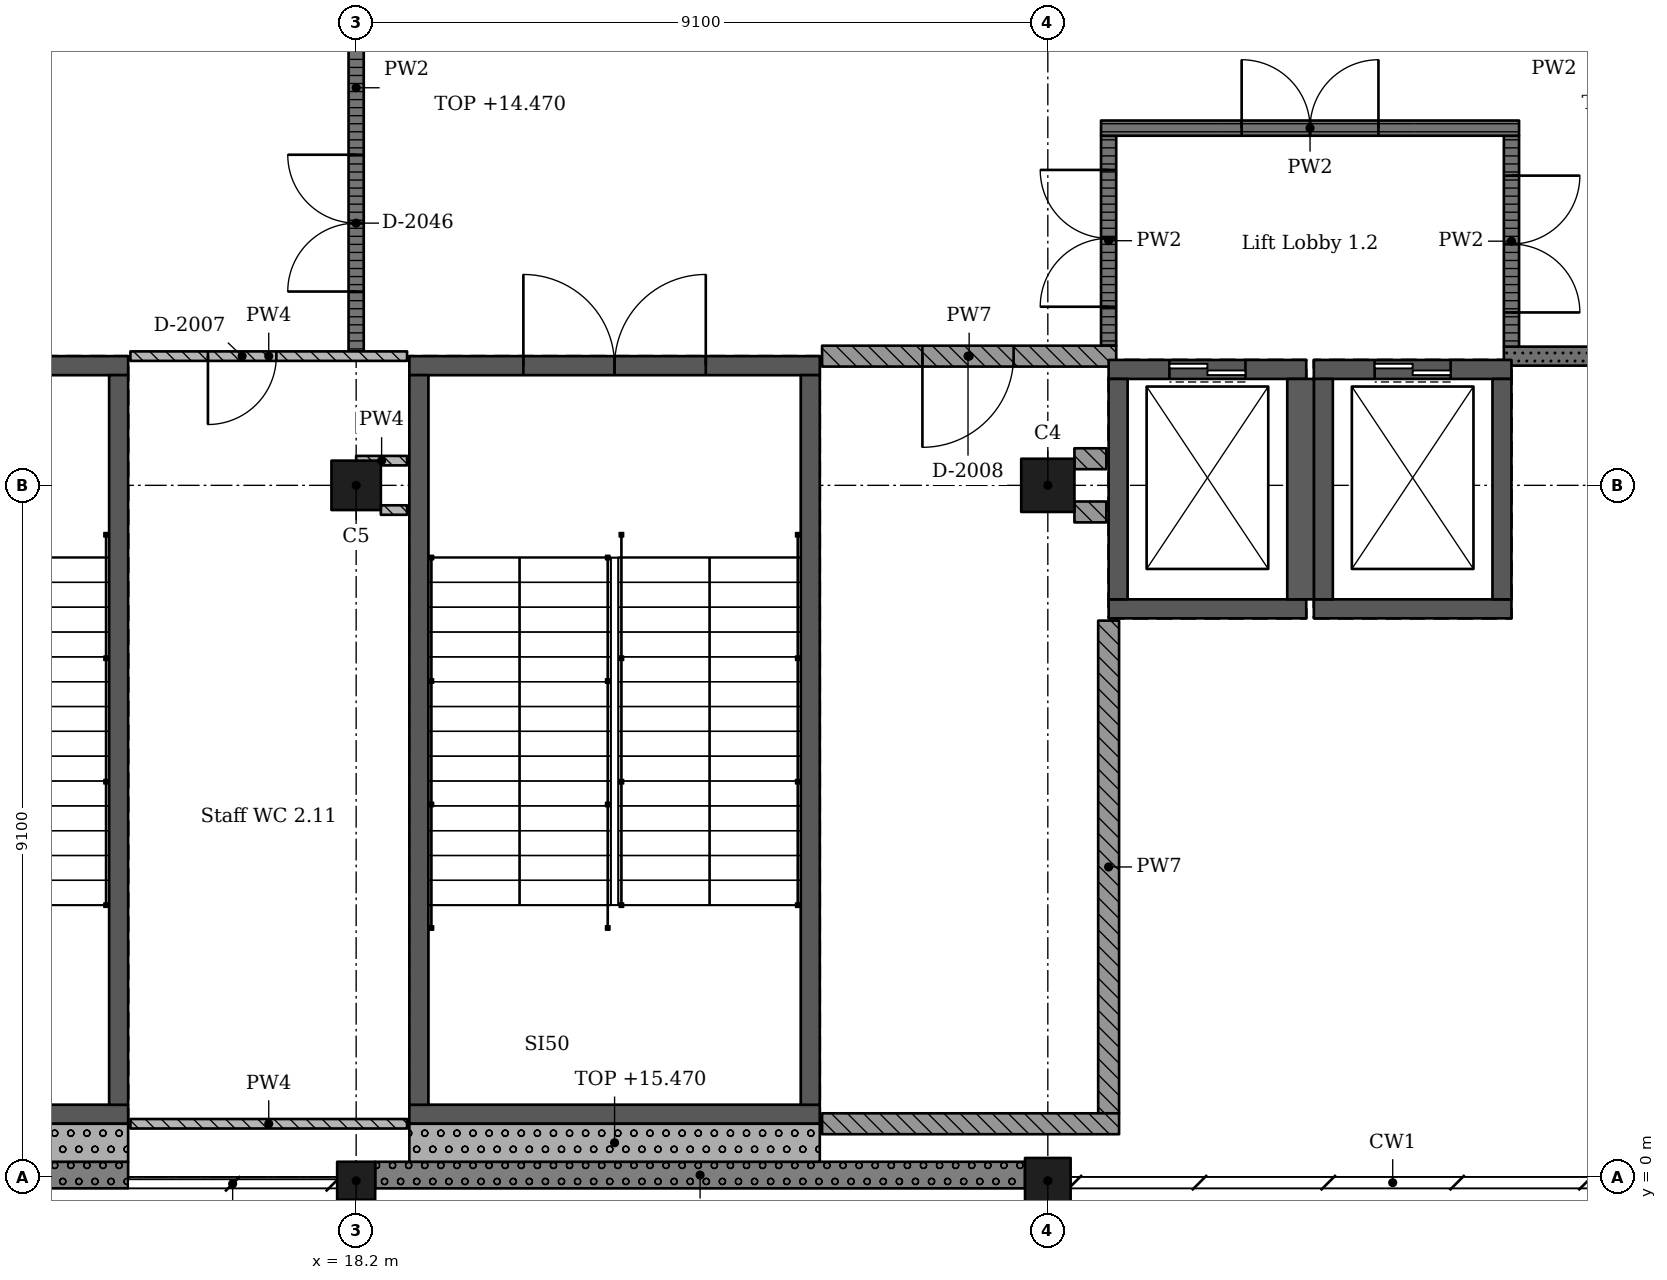
"""IFC4 building model, lengths in metres.
Left out: names, types, materials, properties, quantities, classifications, styles, units other than length and angle.
Written with IfcOpenShell. Run it as: python <this file> out.ifc"""

import sys

from ifc_helpers import new_model, si_unit, direction, frame, frame_2d, origin, origin_2d, place, context, subcontext, project, spatial, rectangle, extrude, element, fill, save


model = new_model("IFC4")
c1 = context("Model", 3, precision=1e-05, world=origin(), true_north=direction((0.0, 1.0)))
c2 = subcontext(c1, "Body", "Model", "MODEL_VIEW")
j1 = project(units=[si_unit("LENGTHUNIT", "METRE"), si_unit("PLANEANGLEUNIT", "RADIAN")], contexts=[c1])
p1 = place(None, origin())
s1 = spatial("IfcSite", under=j1, at=p1, CompositionType="ELEMENT")
p2 = place(p1, origin())
s2 = spatial("IfcBuilding", under=s1, at=p2, CompositionType="ELEMENT")
p3 = place(p2, frame((0.0, 0.0, 10.92)))
s3 = spatial("IfcBuildingStorey", under=s2, at=p3, CompositionType="ELEMENT", Elevation=10.92)
p4 = place(p3, frame((18.2, -0.05, 0.0), z_axis=(0.0, 0.0, 1.0), x_axis=(1.0, 0.0, 0.0)))
e1 = element("IfcColumn", 1, at=p4, inside=s3, PredefinedType="COLUMN", context=c2, shape_type="SweptSolid", body=[
    extrude(rectangle(XDim=0.5, YDim=0.5, at=origin_2d()), origin(), (0.0, 0.0, 1.0), 4.55),
])
p5 = place(p3, frame((18.2, 9.1, 0.0), z_axis=(0.0, 0.0, 1.0), x_axis=(1.0, 0.0, 0.0)))
e2 = element("IfcColumn", 2, at=p5, inside=s3, PredefinedType="COLUMN", context=c2, shape_type="SweptSolid", body=[
    extrude(rectangle(XDim=0.65, YDim=0.65, at=origin_2d()), origin(), (0.0, 0.0, 1.0), 4.55),
])
p6 = place(p3, frame((27.3, -0.05, 0.0), z_axis=(0.0, 0.0, 1.0), x_axis=(1.0, 0.0, 0.0)))
e3 = element("IfcColumn", 3, at=p6, inside=s3, PredefinedType="COLUMN", context=c2, shape_type="SweptSolid", body=[
    extrude(rectangle(XDim=0.6, YDim=0.6, at=origin_2d()), origin(), (0.0, 0.0, 1.0), 4.55),
])
p7 = place(p3, frame((27.3, 9.1, 0.0), z_axis=(0.0, 0.0, 1.0), x_axis=(1.0, 0.0, 0.0)))
e4 = element("IfcColumn", 4, at=p7, inside=s3, PredefinedType="COLUMN", context=c2, shape_type="SweptSolid", body=[
    extrude(rectangle(XDim=0.7, YDim=0.7, at=origin_2d()), origin(), (0.0, 0.0, 1.0), 4.55),
])
p8 = place(p3, frame((30.7, 7.475, 0.0), z_axis=(0.0, 0.0, 1.0), x_axis=(-1.0, 0.0, 0.0)))
e5 = element("IfcWall", 5, at=p8, inside=s3, PredefinedType="SHEAR", context=c2, shape_type="SweptSolid", body=[
    extrude(rectangle(XDim=2.6, YDim=0.25, at=frame_2d((1.3, 0.0))), origin(), (0.0, 0.0, 1.0), 4.55),
])
p9 = place(p3, frame((30.7, 10.625, 0.0), z_axis=(0.0, 0.0, 1.0), x_axis=(-1.0, 0.0, 0.0)))
e6 = element("IfcWall", 6, at=p9, inside=s3, PredefinedType="SHEAR", context=c2, shape_type="SweptSolid", body=[
    extrude(rectangle(XDim=2.6, YDim=0.25, at=frame_2d((1.3, 0.0))), origin(), (0.0, 0.0, 1.0), 4.55),
])
p10 = place(p9, frame((0.8, 0.0, 0.0)))
e7 = element("IfcOpeningElement", 7, at=p10, cuts=e6, PredefinedType="OPENING", context=c2, shape_type="SweptSolid", body=[
    extrude(rectangle(XDim=1.0, YDim=2.1, at=frame_2d((0.5, 1.05))), frame((0.0, 0.135, 0.0), z_axis=(0.0, -1.0, 0.0), x_axis=(1.0, 0.0, 0.0)), (0.0, 0.0, 1.0), 0.27),
])
p11 = place(p3, frame((28.225, 10.5, 0.0), z_axis=(0.0, 0.0, 1.0), x_axis=(0.0, -1.0, 0.0)))
e8 = element("IfcWall", 8, at=p11, inside=s3, PredefinedType="SHEAR", context=c2, shape_type="SweptSolid", body=[
    extrude(rectangle(XDim=2.9, YDim=0.25, at=frame_2d((1.45, 0.0))), origin(), (0.0, 0.0, 1.0), 4.55),
])
p12 = place(p3, frame((30.625, 10.5, 0.0), z_axis=(0.0, 0.0, 1.0), x_axis=(0.0, -1.0, 0.0)))
e9 = element("IfcWall", 9, at=p12, inside=s3, PredefinedType="SHEAR", context=c2, shape_type="SweptSolid", body=[
    extrude(rectangle(XDim=2.9, YDim=0.35, at=frame_2d((1.45, 0.0))), origin(), (0.0, 0.0, 1.0), 4.55),
])
p13 = place(p3, frame((33.4, 7.475, 0.0), z_axis=(0.0, 0.0, 1.0), x_axis=(-1.0, 0.0, 0.0)))
e10 = element("IfcWall", 10, at=p13, inside=s3, PredefinedType="SHEAR", context=c2, shape_type="SweptSolid", body=[
    extrude(rectangle(XDim=2.6, YDim=0.25, at=frame_2d((1.3, 0.0))), origin(), (0.0, 0.0, 1.0), 4.55),
])
p14 = place(p3, frame((33.4, 10.625, 0.0), z_axis=(0.0, 0.0, 1.0), x_axis=(-1.0, 0.0, 0.0)))
e11 = element("IfcWall", 11, at=p14, inside=s3, PredefinedType="SHEAR", context=c2, shape_type="SweptSolid", body=[
    extrude(rectangle(XDim=2.6, YDim=0.25, at=frame_2d((1.3, 0.0))), origin(), (0.0, 0.0, 1.0), 4.55),
])
p15 = place(p14, frame((0.8, 0.0, 0.0)))
e12 = element("IfcOpeningElement", 12, at=p15, cuts=e11, PredefinedType="OPENING", context=c2, shape_type="SweptSolid", body=[
    extrude(rectangle(XDim=1.0, YDim=2.1, at=frame_2d((0.5, 1.05))), frame((0.0, 0.135, 0.0), z_axis=(0.0, -1.0, 0.0), x_axis=(1.0, 0.0, 0.0)), (0.0, 0.0, 1.0), 0.27),
])
for number, where, z_axis, x_axis in (
    (13, (30.925, 10.5, 0.0), (0.0, 0.0, 1.0), (0.0, -1.0, 0.0)),
    (14, (33.275, 10.5, 0.0), (0.0, 0.0, 1.0), (0.0, -1.0, 0.0)),
):
    element("IfcWall", number, at=place(p3, frame(where, z_axis=z_axis, x_axis=x_axis)), inside=s3, PredefinedType="SHEAR", context=c2, shape_type="SweptSolid", body=[
        extrude(rectangle(XDim=2.9, YDim=0.25, at=frame_2d((1.45, 0.0))), origin(), (0.0, 0.0, 1.0), 4.55),
    ])
p16 = place(p3, frame((15.2, 0.825, 0.0), z_axis=(0.0, 0.0, 1.0), x_axis=(-1.0, 0.0, 0.0)))
e15 = element("IfcWall", 15, at=p16, inside=s3, PredefinedType="SHEAR", context=c2, shape_type="SweptSolid", body=[
    extrude(rectangle(XDim=5.4, YDim=0.25, at=frame_2d((2.7, 0.0))), origin(), (0.0, 0.0, 1.0), 4.55),
])
p17 = place(p3, frame((15.2, 10.675, 0.0), z_axis=(0.0, 0.0, 1.0), x_axis=(-1.0, 0.0, 0.0)))
e16 = element("IfcWall", 16, at=p17, inside=s3, PredefinedType="SHEAR", context=c2, shape_type="SweptSolid", body=[
    extrude(rectangle(XDim=5.4, YDim=0.25, at=frame_2d((2.7, 0.0))), origin(), (0.0, 0.0, 1.0), 4.55),
])
p18 = place(p17, frame((1.5, 0.0, 0.0)))
e17 = element("IfcOpeningElement", 17, at=p18, cuts=e16, PredefinedType="OPENING", context=c2, shape_type="SweptSolid", body=[
    extrude(rectangle(XDim=2.4, YDim=2.1, at=frame_2d((1.2, 1.05))), frame((0.0, 0.135, 0.0), z_axis=(0.0, -1.0, 0.0), x_axis=(1.0, 0.0, 0.0)), (0.0, 0.0, 1.0), 0.27),
])
p19 = place(p3, frame((15.075, 10.55, 0.0), z_axis=(0.0, 0.0, 1.0), x_axis=(0.0, -1.0, 0.0)))
e18 = element("IfcWall", 18, at=p19, inside=s3, PredefinedType="SHEAR", context=c2, shape_type="SweptSolid", body=[
    extrude(rectangle(XDim=9.6, YDim=0.25, at=frame_2d((4.8, 0.0))), origin(), (0.0, 0.0, 1.0), 4.55),
])
p20 = place(p3, frame((24.3, 0.825, 0.0), z_axis=(0.0, 0.0, 1.0), x_axis=(-1.0, 0.0, 0.0)))
e19 = element("IfcWall", 19, at=p20, inside=s3, PredefinedType="SHEAR", context=c2, shape_type="SweptSolid", body=[
    extrude(rectangle(XDim=5.4, YDim=0.25, at=frame_2d((2.7, 0.0))), origin(), (0.0, 0.0, 1.0), 4.55),
])
p21 = place(p3, frame((24.3, 10.675, 0.0), z_axis=(0.0, 0.0, 1.0), x_axis=(-1.0, 0.0, 0.0)))
e20 = element("IfcWall", 20, at=p21, inside=s3, PredefinedType="SHEAR", context=c2, shape_type="SweptSolid", body=[
    extrude(rectangle(XDim=5.4, YDim=0.25, at=frame_2d((2.7, 0.0))), origin(), (0.0, 0.0, 1.0), 4.55),
])
p22 = place(p21, frame((1.5, 0.0, 0.0)))
e21 = element("IfcOpeningElement", 21, at=p22, cuts=e20, PredefinedType="OPENING", context=c2, shape_type="SweptSolid", body=[
    extrude(rectangle(XDim=2.4, YDim=2.1, at=frame_2d((1.2, 1.05))), frame((0.0, 0.135, 0.0), z_axis=(0.0, -1.0, 0.0), x_axis=(1.0, 0.0, 0.0)), (0.0, 0.0, 1.0), 0.27),
])
for number, where, z_axis, x_axis in (
    (22, (19.025, 10.55, 0.0), (0.0, 0.0, 1.0), (0.0, -1.0, 0.0)),
    (23, (24.175, 10.55, 0.0), (0.0, 0.0, 1.0), (0.0, -1.0, 0.0)),
):
    element("IfcWall", number, at=place(p3, frame(where, z_axis=z_axis, x_axis=x_axis)), inside=s3, PredefinedType="SHEAR", context=c2, shape_type="SweptSolid", body=[
        extrude(rectangle(XDim=9.6, YDim=0.25, at=frame_2d((4.8, 0.0))), origin(), (0.0, 0.0, 1.0), 4.55),
    ])
p23 = place(p3, frame((9.35, 0.025, 0.0), z_axis=(0.0, 0.0, 1.0), x_axis=(1.0, 0.0, 0.0)))
e24 = element("IfcWall", 24, at=p23, inside=s3, PredefinedType="SOLIDWALL", context=c2, shape_type="SweptSolid", body=[
    extrude(rectangle(XDim=5.85, YDim=0.35, at=frame_2d((2.925, 0.0))), origin(), (0.0, 0.0, 1.0), 3.5),
])
p24 = place(p3, frame((18.45, 0.025, 0.0), z_axis=(0.0, 0.0, 1.0), x_axis=(1.0, 0.0, 0.0)))
e25 = element("IfcWall", 25, at=p24, inside=s3, PredefinedType="SOLIDWALL", context=c2, shape_type="SweptSolid", body=[
    extrude(rectangle(XDim=8.55, YDim=0.35, at=frame_2d((4.275, 0.0))), origin(), (0.0, 0.0, 1.0), 3.5),
])
p25 = place(p3, frame((9.8, 0.45, 0.0), z_axis=(0.0, 0.0, 1.0), x_axis=(1.0, 0.0, 0.0)))
e26 = element("IfcWall", 26, at=p25, inside=s3, PredefinedType="SOLIDWALL", context=c2, shape_type="SweptSolid", body=[
    extrude(rectangle(XDim=5.4, YDim=0.5, at=frame_2d((2.7, 0.0))), origin(), (0.0, 0.0, 1.0), 4.55),
])
p26 = place(p3, frame((18.9, 0.45, 0.0), z_axis=(0.0, 0.0, 1.0), x_axis=(1.0, 0.0, 0.0)))
e27 = element("IfcWall", 27, at=p26, inside=s3, PredefinedType="SOLIDWALL", context=c2, shape_type="SweptSolid", body=[
    extrude(rectangle(XDim=5.4, YDim=0.5, at=frame_2d((2.7, 0.0))), origin(), (0.0, 0.0, 1.0), 4.55),
])
p27 = place(p3, frame((18.2, 9.425, 0.0), z_axis=(0.0, 0.0, 1.0), x_axis=(1.0, 0.0, 0.0)))
e28 = element("IfcWall", 28, at=p27, inside=s3, PredefinedType="PARTITIONING", context=c2, shape_type="SweptSolid", body=[
    extrude(rectangle(XDim=0.67, YDim=0.125, at=frame_2d((0.335, 0.0))), origin(), (0.0, 0.0, 1.0), 4.25),
])
p28 = place(p3, frame((15.23, 10.8, 0.0), z_axis=(0.0, 0.0, 1.0), x_axis=(1.0, 0.0, 0.0)))
e29 = element("IfcWall", 29, at=p28, inside=s3, PredefinedType="PARTITIONING", context=c2, shape_type="SweptSolid", body=[
    extrude(rectangle(XDim=3.64, YDim=0.125, at=frame_2d((1.82, 0.0))), origin(), (0.0, 0.0, 1.0), 4.25),
])
p29 = place(p28, frame((1.02, 0.0, 0.0)))
e30 = element("IfcOpeningElement", 30, at=p29, cuts=e29, PredefinedType="OPENING", context=c2, shape_type="SweptSolid", body=[
    extrude(rectangle(XDim=0.9, YDim=2.1, at=frame_2d((0.45, 1.05))), frame((0.0, 0.073, 0.0), z_axis=(0.0, -1.0, 0.0), x_axis=(1.0, 0.0, 0.0)), (0.0, 0.0, 1.0), 0.145),
])
p30 = place(p3, frame((18.2, 17.8, 0.0), z_axis=(0.0, 0.0, 1.0), x_axis=(0.0, -1.0, 0.0)))
e31 = element("IfcWall", 31, at=p30, inside=s3, PredefinedType="PARTITIONING", context=c2, shape_type="SweptSolid", body=[
    extrude(rectangle(XDim=6.938, YDim=0.2, at=frame_2d((3.469, 0.0))), origin(), (0.0, 0.0, 1.0), 3.55),
])
p31 = place(p30, frame((0.85, 0.0, 0.0)))
e32 = element("IfcOpeningElement", 32, at=p31, cuts=e31, PredefinedType="OPENING", context=c2, shape_type="SweptSolid", body=[
    extrude(rectangle(XDim=1.8, YDim=2.4, at=frame_2d((0.9, 1.2))), frame((0.0, 0.11, 0.0), z_axis=(0.0, -1.0, 0.0), x_axis=(1.0, 0.0, 0.0)), (0.0, 0.0, 1.0), 0.22),
])
p32 = place(p30, frame((4.35, 0.0, 0.0)))
e33 = element("IfcOpeningElement", 33, at=p32, cuts=e31, PredefinedType="OPENING", context=c2, shape_type="SweptSolid", body=[
    extrude(rectangle(XDim=1.8, YDim=2.4, at=frame_2d((0.9, 1.2))), frame((0.0, 0.11, 0.0), z_axis=(0.0, -1.0, 0.0), x_axis=(1.0, 0.0, 0.0)), (0.0, 0.0, 1.0), 0.22),
])
p33 = place(p3, frame((18.525, 8.775, 0.0), z_axis=(0.0, 0.0, 1.0), x_axis=(1.0, 0.0, 0.0)))
e34 = element("IfcWall", 34, at=p33, inside=s3, PredefinedType="PARTITIONING", context=c2, shape_type="SweptSolid", body=[
    extrude(rectangle(XDim=0.345, YDim=0.125, at=frame_2d((0.173, 0.0))), origin(), (0.0, 0.0, 1.0), 4.25),
])
p34 = place(p3, frame((18.87, 0.7, 0.0), z_axis=(0.0, 0.0, 1.0), x_axis=(-1.0, 0.0, 0.0)))
e35 = element("IfcWall", 35, at=p34, inside=s3, PredefinedType="PARTITIONING", context=c2, shape_type="SweptSolid", body=[
    extrude(rectangle(XDim=3.64, YDim=0.125, at=frame_2d((1.82, 0.0))), origin(), (0.0, 0.0, 1.0), 4.25),
])
for number, where, z_axis, x_axis in (
    (36, (27.65, 8.75, 0.0), (0.0, 0.0, 1.0), (1.0, 0.0, 0.0)),
    (37, (28.07, 9.45, 0.0), (0.0, 0.0, 1.0), (-1.0, 0.0, 0.0)),
):
    element("IfcWall", number, at=place(p3, frame(where, z_axis=z_axis, x_axis=x_axis)), inside=s3, PredefinedType="SOLIDWALL", context=c2, shape_type="SweptSolid", body=[
        extrude(rectangle(XDim=0.42, YDim=0.275, at=frame_2d((0.21, 0.0))), origin(), (0.0, 0.0, 1.0), 4.25),
    ])
p35 = place(p3, frame((28.1, 7.32, 0.0), z_axis=(0.0, 0.0, 1.0), x_axis=(0.0, -1.0, 0.0)))
e38 = element("IfcWall", 38, at=p35, inside=s3, PredefinedType="SOLIDWALL", context=c2, shape_type="SweptSolid", body=[
    extrude(rectangle(XDim=6.483, YDim=0.275, at=frame_2d((3.241, 0.0))), origin(), (0.0, 0.0, 1.0), 4.25),
])
p36 = place(p3, frame((28.1, 13.7, 0.0), z_axis=(0.0, 0.0, 1.0), x_axis=(0.0, -1.0, 0.0)))
e39 = element("IfcWall", 39, at=p36, inside=s3, PredefinedType="PARTITIONING", context=c2, shape_type="SweptSolid", body=[
    extrude(rectangle(XDim=2.762, YDim=0.2, at=frame_2d((1.381, 0.0))), origin(), (0.0, 0.0, 1.0), 4.25),
])
p37 = place(p36, frame((0.45, 0.0, 0.0)))
e40 = element("IfcOpeningElement", 40, at=p37, cuts=e39, PredefinedType="OPENING", context=c2, shape_type="SweptSolid", body=[
    extrude(rectangle(XDim=1.8, YDim=2.4, at=frame_2d((0.9, 1.2))), frame((0.0, 0.11, 0.0), z_axis=(0.0, -1.0, 0.0), x_axis=(1.0, 0.0, 0.0)), (0.0, 0.0, 1.0), 0.22),
])
p38 = place(p3, frame((28.2, 10.8, 0.0), z_axis=(0.0, 0.0, 1.0), x_axis=(-1.0, 0.0, 0.0)))
e41 = element("IfcWall", 41, at=p38, inside=s3, PredefinedType="SOLIDWALL", context=c2, shape_type="SweptSolid", body=[
    extrude(rectangle(XDim=3.87, YDim=0.275, at=frame_2d((1.935, 0.0))), origin(), (0.0, 0.0, 1.0), 4.25),
])
p39 = place(p38, frame((1.35, 0.0, 0.0)))
e42 = element("IfcOpeningElement", 42, at=p39, cuts=e41, PredefinedType="OPENING", context=c2, shape_type="SweptSolid", body=[
    extrude(rectangle(XDim=1.2, YDim=2.4, at=frame_2d((0.6, 1.2))), frame((0.0, 0.147, 0.0), z_axis=(0.0, -1.0, 0.0), x_axis=(1.0, 0.0, 0.0)), (0.0, 0.0, 1.0), 0.295),
])
p40 = place(p3, frame((28.238, 0.7, 0.0), z_axis=(0.0, 0.0, 1.0), x_axis=(-1.0, 0.0, 0.0)))
e43 = element("IfcWall", 43, at=p40, inside=s3, PredefinedType="SOLIDWALL", context=c2, shape_type="SweptSolid", body=[
    extrude(rectangle(XDim=3.907, YDim=0.275, at=frame_2d((1.954, 0.0))), origin(), (0.0, 0.0, 1.0), 4.25),
])
p41 = place(p3, frame((33.4, 10.925, 0.0), z_axis=(0.0, 0.0, 1.0), x_axis=(0.0, 1.0, 0.0)))
e44 = element("IfcWall", 44, at=p41, inside=s3, PredefinedType="PARTITIONING", context=c2, shape_type="SweptSolid", body=[
    extrude(rectangle(XDim=2.775, YDim=0.2, at=frame_2d((1.387, 0.0))), origin(), (0.0, 0.0, 1.0), 4.25),
])
p42 = place(p41, frame((0.45, 0.0, 0.0)))
e45 = element("IfcOpeningElement", 45, at=p42, cuts=e44, PredefinedType="OPENING", context=c2, shape_type="SweptSolid", body=[
    extrude(rectangle(XDim=1.8, YDim=2.4, at=frame_2d((0.9, 1.2))), frame((0.0, 0.11, 0.0), z_axis=(0.0, -1.0, 0.0), x_axis=(1.0, 0.0, 0.0)), (0.0, 0.0, 1.0), 0.22),
])
p43 = place(p3, frame((33.5, 13.8, 0.0), z_axis=(0.0, 0.0, 1.0), x_axis=(-1.0, 0.0, 0.0)))
e46 = element("IfcWall", 46, at=p43, inside=s3, PredefinedType="PARTITIONING", context=c2, shape_type="SweptSolid", body=[
    extrude(rectangle(XDim=5.5, YDim=0.2, at=frame_2d((2.75, 0.0))), origin(), (0.0, 0.0, 1.0), 4.25),
])
p44 = place(p43, frame((1.85, 0.0, 0.0)))
e47 = element("IfcOpeningElement", 47, at=p44, cuts=e46, PredefinedType="OPENING", context=c2, shape_type="SweptSolid", body=[
    extrude(rectangle(XDim=1.8, YDim=2.4, at=frame_2d((0.9, 1.2))), frame((0.0, 0.11, 0.0), z_axis=(0.0, -1.0, 0.0), x_axis=(1.0, 0.0, 0.0)), (0.0, 0.0, 1.0), 0.22),
])
p45 = place(p3, frame((36.125, 10.8, 0.0), z_axis=(0.0, 0.0, 1.0), x_axis=(-1.0, 0.0, 0.0)))
e48 = element("IfcWall", 48, at=p45, inside=s3, PredefinedType="SOLIDWALL", context=c2, shape_type="SweptSolid", body=[
    extrude(rectangle(XDim=2.825, YDim=0.25, at=frame_2d((1.413, 0.0))), origin(), (0.0, 0.0, 1.0), 4.25),
])
p46 = place(p29, origin())
e49 = element("IfcDoor", 49, at=p46, inside=s3, OperationType="SINGLE_SWING_LEFT", PredefinedType="DOOR", context=c2, shape_type="SweptSolid", body=[
    extrude(rectangle(XDim=0.9, YDim=2.1, at=frame_2d((0.45, 1.05))), frame((0.0, 0.025, 0.0), z_axis=(0.0, -1.0, 0.0), x_axis=(1.0, 0.0, 0.0)), (0.0, 0.0, 1.0), 0.05),
])
fill(e30, e49)
p47 = place(p39, origin())
e50 = element("IfcDoor", 50, at=p47, inside=s3, OperationType="SINGLE_SWING_LEFT", PredefinedType="DOOR", context=c2, shape_type="SweptSolid", body=[
    extrude(rectangle(XDim=1.2, YDim=2.4, at=frame_2d((0.6, 1.2))), frame((0.0, 0.025, 0.0), z_axis=(0.0, -1.0, 0.0), x_axis=(1.0, 0.0, 0.0)), (0.0, 0.0, 1.0), 0.05),
])
fill(e42, e50)
p48 = place(p32, origin())
e51 = element("IfcDoor", 51, at=p48, inside=s3, OperationType="DOUBLE_DOOR_SINGLE_SWING", PredefinedType="DOOR", context=c2, shape_type="SweptSolid", body=[
    extrude(rectangle(XDim=1.8, YDim=2.4, at=frame_2d((0.9, 1.2))), frame((0.0, 0.025, 0.0), z_axis=(0.0, -1.0, 0.0), x_axis=(1.0, 0.0, 0.0)), (0.0, 0.0, 1.0), 0.05),
])
fill(e33, e51)
p49 = place(p44, origin())
e52 = element("IfcDoor", 52, at=p49, inside=s3, OperationType="DOUBLE_DOOR_SINGLE_SWING", PredefinedType="DOOR", context=c2, shape_type="SweptSolid", body=[
    extrude(rectangle(XDim=1.8, YDim=2.4, at=frame_2d((0.9, 1.2))), frame((0.0, 0.025, 0.0), z_axis=(0.0, -1.0, 0.0), x_axis=(1.0, 0.0, 0.0)), (0.0, 0.0, 1.0), 0.05),
])
fill(e47, e52)
p50 = place(p42, origin())
e53 = element("IfcDoor", 53, at=p50, inside=s3, OperationType="DOUBLE_DOOR_SINGLE_SWING", PredefinedType="DOOR", context=c2, shape_type="SweptSolid", body=[
    extrude(rectangle(XDim=1.8, YDim=2.4, at=frame_2d((0.9, 1.2))), frame((0.0, 0.025, 0.0), z_axis=(0.0, -1.0, 0.0), x_axis=(1.0, 0.0, 0.0)), (0.0, 0.0, 1.0), 0.05),
])
fill(e45, e53)
p51 = place(p37, origin())
e54 = element("IfcDoor", 54, at=p51, inside=s3, OperationType="DOUBLE_DOOR_SINGLE_SWING", PredefinedType="DOOR", context=c2, shape_type="SweptSolid", body=[
    extrude(rectangle(XDim=1.8, YDim=2.4, at=frame_2d((0.9, 1.2))), frame((0.0, 0.025, 0.0), z_axis=(0.0, -1.0, 0.0), x_axis=(1.0, 0.0, 0.0)), (0.0, 0.0, 1.0), 0.05),
])
fill(e40, e54)
p52 = place(p22, origin())
e55 = element("IfcDoor", 55, at=p52, inside=s3, OperationType="DOUBLE_DOOR_SINGLE_SWING", PredefinedType="DOOR", context=c2, shape_type="SweptSolid", body=[
    extrude(rectangle(XDim=2.4, YDim=2.1, at=frame_2d((1.2, 1.05))), frame((0.0, 0.025, 0.0), z_axis=(0.0, -1.0, 0.0), x_axis=(1.0, 0.0, 0.0)), (0.0, 0.0, 1.0), 0.05),
])
fill(e21, e55)
p53 = place(p10, origin())
e56 = element("IfcDoor", 56, at=p53, inside=s3, OperationType="DOUBLE_DOOR_SLIDING", PredefinedType="DOOR", context=c2, shape_type="SweptSolid", body=[
    extrude(rectangle(XDim=1.0, YDim=2.1, at=frame_2d((0.5, 1.05))), frame((0.0, 0.025, 0.0), z_axis=(0.0, -1.0, 0.0), x_axis=(1.0, 0.0, 0.0)), (0.0, 0.0, 1.0), 0.05),
])
fill(e7, e56)
p54 = place(p15, origin())
e57 = element("IfcDoor", 57, at=p54, inside=s3, OperationType="DOUBLE_DOOR_SLIDING", PredefinedType="DOOR", context=c2, shape_type="SweptSolid", body=[
    extrude(rectangle(XDim=1.0, YDim=2.1, at=frame_2d((0.5, 1.05))), frame((0.0, 0.025, 0.0), z_axis=(0.0, -1.0, 0.0), x_axis=(1.0, 0.0, 0.0)), (0.0, 0.0, 1.0), 0.05),
])
fill(e12, e57)
save(model, sys.argv[1])
